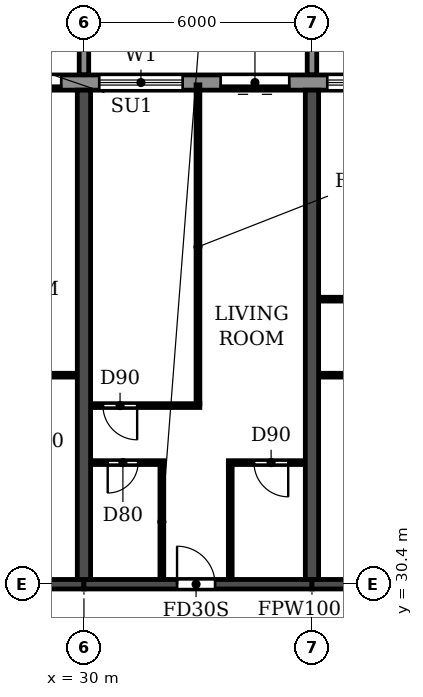
"""IFC4 building model, lengths in metres.
Left out: names, types, materials, properties, quantities, classifications, styles, units other than length and angle.
Written with IfcOpenShell. Run it as: python <this file> out.ifc"""

import sys

from ifc_helpers import new_model, si_unit, direction, frame, frame_2d, origin, place, context, subcontext, project, spatial, polyline, rectangle, outline, extrude, source, transform, mapped, element, fill, save


model = new_model("IFC4")
c1 = context("Model", 3, precision=1e-05, world=origin(), true_north=direction((0.0, 1.0)))
c2 = subcontext(c1, "Body", "Model", "MODEL_VIEW")
j1 = project(units=[si_unit("LENGTHUNIT", "METRE"), si_unit("PLANEANGLEUNIT", "RADIAN")], contexts=[c1])
p1 = place(None, origin())
s1 = spatial("IfcSite", under=j1, at=p1, CompositionType="ELEMENT")
p2 = place(p1, origin())
s2 = spatial("IfcBuilding", under=s1, at=p2, CompositionType="ELEMENT")
p3 = place(p2, frame((0.0, 0.0, 72.9)))
s3 = spatial("IfcBuildingStorey", under=s2, at=p3, CompositionType="ELEMENT", Elevation=72.9)
for number, where, z_axis, x_axis in (
    (1, (30.0, 30.525, 0.0), (0.0, 0.0, 1.0), (0.0, 1.0, 0.0)),
    (2, (36.0, 30.525, 0.0), (0.0, 0.0, 1.0), (0.0, 1.0, 0.0)),
):
    element("IfcWall", number, at=place(p3, frame(where, z_axis=z_axis, x_axis=x_axis)), inside=s3, PredefinedType="SHEAR", context=c2, shape_type="SweptSolid", body=[
        extrude(rectangle(XDim=12.875, YDim=0.35, at=frame_2d((6.438, 0.0))), origin(), (0.0, 0.0, 1.0), 3.06),
    ])
p4 = place(p3, frame((24.0, 30.4, 0.0), z_axis=(0.0, 0.0, 1.0), x_axis=(1.0, 0.0, 0.0)))
e3 = element("IfcWall", 3, at=p4, inside=s3, PredefinedType="SHEAR", context=c2, shape_type="SweptSolid", body=[
    extrude(rectangle(XDim=6.0, YDim=0.25, at=frame_2d((3.0, 0.0))), origin(), (0.0, 0.0, 1.0), 2.46),
])
p5 = place(p4, frame((2.55, 0.0, 0.0)))
e4 = element("IfcOpeningElement", 4, at=p5, cuts=e3, PredefinedType="OPENING", context=c2, shape_type="SweptSolid", body=[
    extrude(rectangle(XDim=1.0, YDim=2.1, at=frame_2d((0.5, 1.05))), frame((0.0, 0.135, 0.0), z_axis=(0.0, -1.0, 0.0), x_axis=(1.0, 0.0, 0.0)), (0.0, 0.0, 1.0), 0.27),
])
p6 = place(p3, frame((30.0, 30.4, 0.0), z_axis=(0.0, 0.0, 1.0), x_axis=(1.0, 0.0, 0.0)))
e5 = element("IfcWall", 5, at=p6, inside=s3, PredefinedType="SHEAR", context=c2, shape_type="SweptSolid", body=[
    extrude(rectangle(XDim=6.0, YDim=0.25, at=frame_2d((3.0, 0.0))), origin(), (0.0, 0.0, 1.0), 2.46),
])
p7 = place(p6, frame((2.45, 0.0, 0.0)))
e6 = element("IfcOpeningElement", 6, at=p7, cuts=e5, PredefinedType="OPENING", context=c2, shape_type="SweptSolid", body=[
    extrude(rectangle(XDim=1.0, YDim=2.1, at=frame_2d((0.5, 1.05))), frame((0.0, 0.135, 0.0), z_axis=(0.0, -1.0, 0.0), x_axis=(1.0, 0.0, 0.0)), (0.0, 0.0, 1.0), 0.27),
])
p8 = place(p3, frame((36.0, 30.4, 0.0), z_axis=(0.0, 0.0, 1.0), x_axis=(1.0, 0.0, 0.0)))
e7 = element("IfcWall", 7, at=p8, inside=s3, PredefinedType="SHEAR", context=c2, shape_type="SweptSolid", body=[
    extrude(rectangle(XDim=6.0, YDim=0.25, at=frame_2d((3.0, 0.0))), origin(), (0.0, 0.0, 1.0), 2.46),
])
p9 = place(p3, frame((91.317, 43.6, 0.0), z_axis=(0.0, 0.0, 1.0), x_axis=(-1.0, 0.0, 0.0)))
e8 = element("IfcWall", 8, at=p9, inside=s3, PredefinedType="STANDARD", context=c2, shape_type="SweptSolid", body=[
    extrude(rectangle(XDim=80.634, YDim=0.4, at=frame_2d((40.317, 0.0))), origin(), (0.0, 0.0, 1.0), 3.06),
])
p10 = place(p9, frame((76.717, 0.0, 0.9)))
e9 = element("IfcOpeningElement", 9, at=p10, cuts=e8, PredefinedType="OPENING", context=c2, shape_type="SweptSolid", body=[
    extrude(rectangle(XDim=2.2, YDim=1.5, at=frame_2d((1.1, 0.75))), frame((0.0, 0.21, 0.0), z_axis=(0.0, -1.0, 0.0), x_axis=(1.0, 0.0, 0.0)), (0.0, 0.0, 1.0), 0.42),
])
p11 = place(p9, frame((73.917, 0.0, 0.0)))
e10 = element("IfcOpeningElement", 10, at=p11, cuts=e8, PredefinedType="OPENING", context=c2, shape_type="SweptSolid", body=[
    extrude(rectangle(XDim=1.8, YDim=2.4, at=frame_2d((0.9, 1.2))), frame((0.0, 0.21, 0.0), z_axis=(0.0, -1.0, 0.0), x_axis=(1.0, 0.0, 0.0)), (0.0, 0.0, 1.0), 0.42),
])
p12 = place(p9, frame((70.917, 0.0, 0.0)))
e11 = element("IfcOpeningElement", 11, at=p12, cuts=e8, PredefinedType="OPENING", context=c2, shape_type="SweptSolid", body=[
    extrude(rectangle(XDim=1.8, YDim=2.4, at=frame_2d((0.9, 1.2))), frame((0.0, 0.21, 0.0), z_axis=(0.0, -1.0, 0.0), x_axis=(1.0, 0.0, 0.0)), (0.0, 0.0, 1.0), 0.42),
])
p13 = place(p9, frame((67.717, 0.0, 0.9)))
e12 = element("IfcOpeningElement", 12, at=p13, cuts=e8, PredefinedType="OPENING", context=c2, shape_type="SweptSolid", body=[
    extrude(rectangle(XDim=2.2, YDim=1.5, at=frame_2d((1.1, 0.75))), frame((0.0, 0.21, 0.0), z_axis=(0.0, -1.0, 0.0), x_axis=(1.0, 0.0, 0.0)), (0.0, 0.0, 1.0), 0.42),
])
p14 = place(p9, frame((64.717, 0.0, 0.9)))
e13 = element("IfcOpeningElement", 13, at=p14, cuts=e8, PredefinedType="OPENING", context=c2, shape_type="SweptSolid", body=[
    extrude(rectangle(XDim=2.2, YDim=1.5, at=frame_2d((1.1, 0.75))), frame((0.0, 0.21, 0.0), z_axis=(0.0, -1.0, 0.0), x_axis=(1.0, 0.0, 0.0)), (0.0, 0.0, 1.0), 0.42),
])
p15 = place(p9, frame((61.917, 0.0, 0.0)))
e14 = element("IfcOpeningElement", 14, at=p15, cuts=e8, PredefinedType="OPENING", context=c2, shape_type="SweptSolid", body=[
    extrude(rectangle(XDim=1.8, YDim=2.4, at=frame_2d((0.9, 1.2))), frame((0.0, 0.21, 0.0), z_axis=(0.0, -1.0, 0.0), x_axis=(1.0, 0.0, 0.0)), (0.0, 0.0, 1.0), 0.42),
])
p16 = place(p9, frame((58.717, 0.0, 0.9)))
e15 = element("IfcOpeningElement", 15, at=p16, cuts=e8, PredefinedType="OPENING", context=c2, shape_type="SweptSolid", body=[
    extrude(rectangle(XDim=2.2, YDim=1.5, at=frame_2d((1.1, 0.75))), frame((0.0, 0.21, 0.0), z_axis=(0.0, -1.0, 0.0), x_axis=(1.0, 0.0, 0.0)), (0.0, 0.0, 1.0), 0.42),
])
p17 = place(p9, frame((55.917, 0.0, 0.0)))
e16 = element("IfcOpeningElement", 16, at=p17, cuts=e8, PredefinedType="OPENING", context=c2, shape_type="SweptSolid", body=[
    extrude(rectangle(XDim=1.8, YDim=2.4, at=frame_2d((0.9, 1.2))), frame((0.0, 0.21, 0.0), z_axis=(0.0, -1.0, 0.0), x_axis=(1.0, 0.0, 0.0)), (0.0, 0.0, 1.0), 0.42),
])
p18 = place(p9, frame((52.717, 0.0, 0.9)))
e17 = element("IfcOpeningElement", 17, at=p18, cuts=e8, PredefinedType="OPENING", context=c2, shape_type="SweptSolid", body=[
    extrude(rectangle(XDim=2.2, YDim=1.5, at=frame_2d((1.1, 0.75))), frame((0.0, 0.21, 0.0), z_axis=(0.0, -1.0, 0.0), x_axis=(1.0, 0.0, 0.0)), (0.0, 0.0, 1.0), 0.42),
])
p19 = place(p9, frame((49.717, 0.0, 0.9)))
e18 = element("IfcOpeningElement", 18, at=p19, cuts=e8, PredefinedType="OPENING", context=c2, shape_type="SweptSolid", body=[
    extrude(rectangle(XDim=2.2, YDim=1.5, at=frame_2d((1.1, 0.75))), frame((0.0, 0.21, 0.0), z_axis=(0.0, -1.0, 0.0), x_axis=(1.0, 0.0, 0.0)), (0.0, 0.0, 1.0), 0.42),
])
p20 = place(p9, frame((46.917, 0.0, 0.0)))
e19 = element("IfcOpeningElement", 19, at=p20, cuts=e8, PredefinedType="OPENING", context=c2, shape_type="SweptSolid", body=[
    extrude(rectangle(XDim=1.8, YDim=2.4, at=frame_2d((0.9, 1.2))), frame((0.0, 0.21, 0.0), z_axis=(0.0, -1.0, 0.0), x_axis=(1.0, 0.0, 0.0)), (0.0, 0.0, 1.0), 0.42),
])
p21 = place(p9, frame((43.717, 0.0, 0.9)))
e20 = element("IfcOpeningElement", 20, at=p21, cuts=e8, PredefinedType="OPENING", context=c2, shape_type="SweptSolid", body=[
    extrude(rectangle(XDim=2.2, YDim=1.5, at=frame_2d((1.1, 0.75))), frame((0.0, 0.21, 0.0), z_axis=(0.0, -1.0, 0.0), x_axis=(1.0, 0.0, 0.0)), (0.0, 0.0, 1.0), 0.42),
])
p22 = place(p9, frame((40.717, 0.0, 0.9)))
e21 = element("IfcOpeningElement", 21, at=p22, cuts=e8, PredefinedType="OPENING", context=c2, shape_type="SweptSolid", body=[
    extrude(rectangle(XDim=2.2, YDim=1.5, at=frame_2d((1.1, 0.75))), frame((0.0, 0.21, 0.0), z_axis=(0.0, -1.0, 0.0), x_axis=(1.0, 0.0, 0.0)), (0.0, 0.0, 1.0), 0.42),
])
p23 = place(p9, frame((37.917, 0.0, 0.0)))
e22 = element("IfcOpeningElement", 22, at=p23, cuts=e8, PredefinedType="OPENING", context=c2, shape_type="SweptSolid", body=[
    extrude(rectangle(XDim=1.8, YDim=2.4, at=frame_2d((0.9, 1.2))), frame((0.0, 0.21, 0.0), z_axis=(0.0, -1.0, 0.0), x_axis=(1.0, 0.0, 0.0)), (0.0, 0.0, 1.0), 0.42),
])
p24 = place(p9, frame((34.717, 0.0, 0.9)))
e23 = element("IfcOpeningElement", 23, at=p24, cuts=e8, PredefinedType="OPENING", context=c2, shape_type="SweptSolid", body=[
    extrude(rectangle(XDim=2.2, YDim=1.5, at=frame_2d((1.1, 0.75))), frame((0.0, 0.21, 0.0), z_axis=(0.0, -1.0, 0.0), x_axis=(1.0, 0.0, 0.0)), (0.0, 0.0, 1.0), 0.42),
])
p25 = place(p9, frame((31.917, 0.0, 0.0)))
e24 = element("IfcOpeningElement", 24, at=p25, cuts=e8, PredefinedType="OPENING", context=c2, shape_type="SweptSolid", body=[
    extrude(rectangle(XDim=1.8, YDim=2.4, at=frame_2d((0.9, 1.2))), frame((0.0, 0.21, 0.0), z_axis=(0.0, -1.0, 0.0), x_axis=(1.0, 0.0, 0.0)), (0.0, 0.0, 1.0), 0.42),
])
p26 = place(p9, frame((28.717, 0.0, 0.9)))
e25 = element("IfcOpeningElement", 25, at=p26, cuts=e8, PredefinedType="OPENING", context=c2, shape_type="SweptSolid", body=[
    extrude(rectangle(XDim=2.2, YDim=1.5, at=frame_2d((1.1, 0.75))), frame((0.0, 0.21, 0.0), z_axis=(0.0, -1.0, 0.0), x_axis=(1.0, 0.0, 0.0)), (0.0, 0.0, 1.0), 0.42),
])
p27 = place(p9, frame((25.717, 0.0, 0.9)))
e26 = element("IfcOpeningElement", 26, at=p27, cuts=e8, PredefinedType="OPENING", context=c2, shape_type="SweptSolid", body=[
    extrude(rectangle(XDim=2.2, YDim=1.5, at=frame_2d((1.1, 0.75))), frame((0.0, 0.21, 0.0), z_axis=(0.0, -1.0, 0.0), x_axis=(1.0, 0.0, 0.0)), (0.0, 0.0, 1.0), 0.42),
])
p28 = place(p9, frame((22.717, 0.0, 0.9)))
e27 = element("IfcOpeningElement", 27, at=p28, cuts=e8, PredefinedType="OPENING", context=c2, shape_type="SweptSolid", body=[
    extrude(rectangle(XDim=2.2, YDim=1.5, at=frame_2d((1.1, 0.75))), frame((0.0, 0.21, 0.0), z_axis=(0.0, -1.0, 0.0), x_axis=(1.0, 0.0, 0.0)), (0.0, 0.0, 1.0), 0.42),
])
p29 = place(p9, frame((19.917, 0.0, 0.0)))
e28 = element("IfcOpeningElement", 28, at=p29, cuts=e8, PredefinedType="OPENING", context=c2, shape_type="SweptSolid", body=[
    extrude(rectangle(XDim=1.8, YDim=2.4, at=frame_2d((0.9, 1.2))), frame((0.0, 0.21, 0.0), z_axis=(0.0, -1.0, 0.0), x_axis=(1.0, 0.0, 0.0)), (0.0, 0.0, 1.0), 0.42),
])
p30 = place(p9, frame((16.717, 0.0, 0.9)))
e29 = element("IfcOpeningElement", 29, at=p30, cuts=e8, PredefinedType="OPENING", context=c2, shape_type="SweptSolid", body=[
    extrude(rectangle(XDim=2.2, YDim=1.5, at=frame_2d((1.1, 0.75))), frame((0.0, 0.21, 0.0), z_axis=(0.0, -1.0, 0.0), x_axis=(1.0, 0.0, 0.0)), (0.0, 0.0, 1.0), 0.42),
])
p31 = place(p9, frame((13.717, 0.0, 0.9)))
e30 = element("IfcOpeningElement", 30, at=p31, cuts=e8, PredefinedType="OPENING", context=c2, shape_type="SweptSolid", body=[
    extrude(rectangle(XDim=2.2, YDim=1.5, at=frame_2d((1.1, 0.75))), frame((0.0, 0.21, 0.0), z_axis=(0.0, -1.0, 0.0), x_axis=(1.0, 0.0, 0.0)), (0.0, 0.0, 1.0), 0.42),
])
p32 = place(p9, frame((10.717, 0.0, 0.9)))
e31 = element("IfcOpeningElement", 31, at=p32, cuts=e8, PredefinedType="OPENING", context=c2, shape_type="SweptSolid", body=[
    extrude(rectangle(XDim=2.2, YDim=1.5, at=frame_2d((1.1, 0.75))), frame((0.0, 0.21, 0.0), z_axis=(0.0, -1.0, 0.0), x_axis=(1.0, 0.0, 0.0)), (0.0, 0.0, 1.0), 0.42),
])
p33 = place(p9, frame((7.917, 0.0, 0.0)))
e32 = element("IfcOpeningElement", 32, at=p33, cuts=e8, PredefinedType="OPENING", context=c2, shape_type="SweptSolid", body=[
    extrude(rectangle(XDim=1.8, YDim=2.4, at=frame_2d((0.9, 1.2))), frame((0.0, 0.21, 0.0), z_axis=(0.0, -1.0, 0.0), x_axis=(1.0, 0.0, 0.0)), (0.0, 0.0, 1.0), 0.42),
])
p34 = place(p9, frame((4.717, 0.0, 0.9)))
e33 = element("IfcOpeningElement", 33, at=p34, cuts=e8, PredefinedType="OPENING", context=c2, shape_type="SweptSolid", body=[
    extrude(rectangle(XDim=2.2, YDim=1.5, at=frame_2d((1.1, 0.75))), frame((0.0, 0.21, 0.0), z_axis=(0.0, -1.0, 0.0), x_axis=(1.0, 0.0, 0.0)), (0.0, 0.0, 1.0), 0.42),
])
p35 = place(p9, frame((1.917, 0.0, 0.0)))
e34 = element("IfcOpeningElement", 34, at=p35, cuts=e8, PredefinedType="OPENING", context=c2, shape_type="SweptSolid", body=[
    extrude(rectangle(XDim=1.8, YDim=2.4, at=frame_2d((0.9, 1.2))), frame((0.0, 0.21, 0.0), z_axis=(0.0, -1.0, 0.0), x_axis=(1.0, 0.0, 0.0)), (0.0, 0.0, 1.0), 0.42),
])
m1 = source(origin(), c2, "Body", "SweptSolid", [
    extrude(outline(polyline([(0.0, 0.0), (0.25, 0.0), (0.25, 3.1), (0.0, 3.1), (0.0, 0.0)])), origin(), (0.0, 0.0, 1.0), 3.1),
])
for number, where in (
    (35, (29.875, 43.8, 0.0)),
    (36, (35.875, 43.8, 0.0)),
):
    element("IfcWall", number, at=place(p3, frame(where)), inside=s3, PredefinedType="STANDARD", context=c2, shape_type="MappedRepresentation", body=[
        mapped(m1, transform((0.0, 0.0, 0.0))),
    ])
p36 = place(p3, frame((30.185, 33.6, 0.0), z_axis=(0.0, 0.0, 1.0), x_axis=(1.0, 0.0, 0.0)))
e37 = element("IfcWall", 37, at=p36, inside=s3, PredefinedType="PARTITIONING", context=c2, shape_type="SweptSolid", body=[
    extrude(rectangle(XDim=1.915, YDim=0.1, at=frame_2d((0.958, 0.0))), origin(), (0.0, 0.0, 1.0), 3.06),
])
p37 = place(p36, frame((0.44, 0.0, 0.0)))
e38 = element("IfcOpeningElement", 38, at=p37, cuts=e37, PredefinedType="OPENING", context=c2, shape_type="SweptSolid", body=[
    extrude(rectangle(XDim=0.8, YDim=2.1, at=frame_2d((0.4, 1.05))), frame((0.0, 0.06, 0.0), z_axis=(0.0, -1.0, 0.0), x_axis=(1.0, 0.0, 0.0)), (0.0, 0.0, 1.0), 0.12),
])
p38 = place(p3, frame((33.8, 33.6, 0.0), z_axis=(0.0, 0.0, 1.0), x_axis=(1.0, 0.0, 0.0)))
e39 = element("IfcWall", 39, at=p38, inside=s3, PredefinedType="PARTITIONING", context=c2, shape_type="SweptSolid", body=[
    extrude(rectangle(XDim=2.015, YDim=0.1, at=frame_2d((1.007, 0.0))), origin(), (0.0, 0.0, 1.0), 3.06),
])
p39 = place(p38, frame((0.675, 0.0, 0.0)))
e40 = element("IfcOpeningElement", 40, at=p39, cuts=e39, PredefinedType="OPENING", context=c2, shape_type="SweptSolid", body=[
    extrude(rectangle(XDim=0.9, YDim=2.1, at=frame_2d((0.45, 1.05))), frame((0.0, 0.06, 0.0), z_axis=(0.0, -1.0, 0.0), x_axis=(1.0, 0.0, 0.0)), (0.0, 0.0, 1.0), 0.12),
])
p40 = place(p3, frame((30.185, 35.1, 0.0), z_axis=(0.0, 0.0, 1.0), x_axis=(1.0, 0.0, 0.0)))
e41 = element("IfcWall", 41, at=p40, inside=s3, PredefinedType="PARTITIONING", context=c2, shape_type="SweptSolid", body=[
    extrude(rectangle(XDim=2.865, YDim=0.1, at=frame_2d((1.433, 0.0))), origin(), (0.0, 0.0, 1.0), 3.06),
])
p41 = place(p40, frame((0.315, 0.0, 0.0)))
e42 = element("IfcOpeningElement", 42, at=p41, cuts=e41, PredefinedType="OPENING", context=c2, shape_type="SweptSolid", body=[
    extrude(rectangle(XDim=0.9, YDim=2.1, at=frame_2d((0.45, 1.05))), frame((0.0, 0.06, 0.0), z_axis=(0.0, -1.0, 0.0), x_axis=(1.0, 0.0, 0.0)), (0.0, 0.0, 1.0), 0.12),
])
p42 = place(p3, frame((27.9, 35.9, 0.0), z_axis=(0.0, 0.0, 1.0), x_axis=(1.0, 0.0, 0.0)))
e43 = element("IfcWall", 43, at=p42, inside=s3, PredefinedType="PARTITIONING", context=c2, shape_type="SweptSolid", body=[
    extrude(rectangle(XDim=1.915, YDim=0.1, at=frame_2d((0.958, 0.0))), origin(), (0.0, 0.0, 1.0), 3.06),
])
p43 = place(p3, frame((36.185, 35.9, 0.0), z_axis=(0.0, 0.0, 1.0), x_axis=(1.0, 0.0, 0.0)))
e44 = element("IfcWall", 44, at=p43, inside=s3, PredefinedType="PARTITIONING", context=c2, shape_type="SweptSolid", body=[
    extrude(rectangle(XDim=3.165, YDim=0.1, at=frame_2d((1.583, 0.0))), origin(), (0.0, 0.0, 1.0), 3.06),
])
p44 = place(p43, frame((1.065, 0.0, 0.0)))
e45 = element("IfcOpeningElement", 45, at=p44, cuts=e44, PredefinedType="OPENING", context=c2, shape_type="SweptSolid", body=[
    extrude(rectangle(XDim=0.8, YDim=2.1, at=frame_2d((0.4, 1.05))), frame((0.0, 0.06, 0.0), z_axis=(0.0, -1.0, 0.0), x_axis=(1.0, 0.0, 0.0)), (0.0, 0.0, 1.0), 0.12),
])
p45 = place(p3, frame((36.185, 37.9, 0.0), z_axis=(0.0, 0.0, 1.0), x_axis=(1.0, 0.0, 0.0)))
e46 = element("IfcWall", 46, at=p45, inside=s3, PredefinedType="PARTITIONING", context=c2, shape_type="SweptSolid", body=[
    extrude(rectangle(XDim=5.63, YDim=0.1, at=frame_2d((2.815, 0.0))), origin(), (0.0, 0.0, 1.0), 3.06),
])
p46 = place(p45, frame((1.965, 0.0, 0.0)))
e47 = element("IfcOpeningElement", 47, at=p46, cuts=e46, PredefinedType="OPENING", context=c2, shape_type="SweptSolid", body=[
    extrude(rectangle(XDim=0.9, YDim=2.1, at=frame_2d((0.45, 1.05))), frame((0.0, 0.06, 0.0), z_axis=(0.0, -1.0, 0.0), x_axis=(1.0, 0.0, 0.0)), (0.0, 0.0, 1.0), 0.12),
])
p47 = place(p3, frame((32.05, 30.535, 0.0), z_axis=(0.0, 0.0, 1.0), x_axis=(0.0, 1.0, 0.0)))
e48 = element("IfcWall", 48, at=p47, inside=s3, PredefinedType="PARTITIONING", context=c2, shape_type="SweptSolid", body=[
    extrude(rectangle(XDim=3.015, YDim=0.1, at=frame_2d((1.508, 0.0))), origin(), (0.0, 0.0, 1.0), 3.06),
])
p48 = place(p3, frame((33.0, 35.15, 0.0), z_axis=(0.0, 0.0, 1.0), x_axis=(0.0, 1.0, 0.0)))
e49 = element("IfcWall", 49, at=p48, inside=s3, PredefinedType="PARTITIONING", context=c2, shape_type="SweptSolid", body=[
    extrude(rectangle(XDim=8.39, YDim=0.1, at=frame_2d((4.195, 0.0))), origin(), (0.0, 0.0, 1.0), 3.06),
])
p49 = place(p3, frame((33.85, 30.535, 0.0), z_axis=(0.0, 0.0, 1.0), x_axis=(0.0, 1.0, 0.0)))
e50 = element("IfcWall", 50, at=p49, inside=s3, PredefinedType="PARTITIONING", context=c2, shape_type="SweptSolid", body=[
    extrude(rectangle(XDim=3.015, YDim=0.1, at=frame_2d((1.508, 0.0))), origin(), (0.0, 0.0, 1.0), 3.06),
])
p50 = place(p15, origin())
e51 = element("IfcDoor", 51, at=p50, inside=s3, OperationType="DOUBLE_DOOR_SLIDING", PredefinedType="DOOR", context=c2, shape_type="SweptSolid", body=[
    extrude(rectangle(XDim=1.8, YDim=2.4, at=frame_2d((0.9, 1.2))), frame((0.0, 0.025, 0.0), z_axis=(0.0, -1.0, 0.0), x_axis=(1.0, 0.0, 0.0)), (0.0, 0.0, 1.0), 0.05),
])
fill(e14, e51)
p51 = place(p16, origin())
e52 = element("IfcWindow", 52, at=p51, inside=s3, PartitioningType="DOUBLE_PANEL_HORIZONTAL", PredefinedType="WINDOW", context=c2, shape_type="SweptSolid", body=[
    extrude(rectangle(XDim=2.2, YDim=1.5, at=frame_2d((1.1, 0.75))), frame((0.0, 0.03, 0.0), z_axis=(0.0, -1.0, 0.0), x_axis=(1.0, 0.0, 0.0)), (0.0, 0.0, 1.0), 0.06),
])
fill(e15, e52)
p52 = place(p17, origin())
e53 = element("IfcDoor", 53, at=p52, inside=s3, OperationType="DOUBLE_DOOR_SLIDING", PredefinedType="DOOR", context=c2, shape_type="SweptSolid", body=[
    extrude(rectangle(XDim=1.8, YDim=2.4, at=frame_2d((0.9, 1.2))), frame((0.0, 0.025, 0.0), z_axis=(0.0, -1.0, 0.0), x_axis=(1.0, 0.0, 0.0)), (0.0, 0.0, 1.0), 0.05),
])
fill(e16, e53)
p53 = place(p18, origin())
e54 = element("IfcWindow", 54, at=p53, inside=s3, PartitioningType="DOUBLE_PANEL_HORIZONTAL", PredefinedType="WINDOW", context=c2, shape_type="SweptSolid", body=[
    extrude(rectangle(XDim=2.2, YDim=1.5, at=frame_2d((1.1, 0.75))), frame((0.0, 0.03, 0.0), z_axis=(0.0, -1.0, 0.0), x_axis=(1.0, 0.0, 0.0)), (0.0, 0.0, 1.0), 0.06),
])
fill(e17, e54)
p54 = place(p41, frame((0.9, 0.0, 0.0), z_axis=(0.0, 0.0, 1.0), x_axis=(-1.0, 0.0, 0.0)))
e55 = element("IfcDoor", 55, at=p54, inside=s3, OperationType="SINGLE_SWING_LEFT", PredefinedType="DOOR", context=c2, shape_type="SweptSolid", body=[
    extrude(rectangle(XDim=0.9, YDim=2.1, at=frame_2d((0.45, 1.05))), frame((0.0, 0.025, 0.0), z_axis=(0.0, -1.0, 0.0), x_axis=(1.0, 0.0, 0.0)), (0.0, 0.0, 1.0), 0.05),
])
fill(e42, e55)
p55 = place(p37, frame((0.8, 0.0, 0.0), z_axis=(0.0, 0.0, 1.0), x_axis=(-1.0, 0.0, 0.0)))
e56 = element("IfcDoor", 56, at=p55, inside=s3, OperationType="SINGLE_SWING_RIGHT", PredefinedType="DOOR", context=c2, shape_type="SweptSolid", body=[
    extrude(rectangle(XDim=0.8, YDim=2.1, at=frame_2d((0.4, 1.05))), frame((0.0, 0.025, 0.0), z_axis=(0.0, -1.0, 0.0), x_axis=(1.0, 0.0, 0.0)), (0.0, 0.0, 1.0), 0.05),
])
fill(e38, e56)
p56 = place(p7, origin())
e57 = element("IfcDoor", 57, at=p56, inside=s3, OperationType="SINGLE_SWING_LEFT", PredefinedType="DOOR", context=c2, shape_type="SweptSolid", body=[
    extrude(rectangle(XDim=1.0, YDim=2.1, at=frame_2d((0.5, 1.05))), frame((0.0, 0.025, 0.0), z_axis=(0.0, -1.0, 0.0), x_axis=(1.0, 0.0, 0.0)), (0.0, 0.0, 1.0), 0.05),
])
fill(e6, e57)
p57 = place(p39, frame((0.9, 0.0, 0.0), z_axis=(0.0, 0.0, 1.0), x_axis=(-1.0, 0.0, 0.0)))
e58 = element("IfcDoor", 58, at=p57, inside=s3, OperationType="SINGLE_SWING_LEFT", PredefinedType="DOOR", context=c2, shape_type="SweptSolid", body=[
    extrude(rectangle(XDim=0.9, YDim=2.1, at=frame_2d((0.45, 1.05))), frame((0.0, 0.025, 0.0), z_axis=(0.0, -1.0, 0.0), x_axis=(1.0, 0.0, 0.0)), (0.0, 0.0, 1.0), 0.05),
])
fill(e40, e58)
save(model, sys.argv[1])
